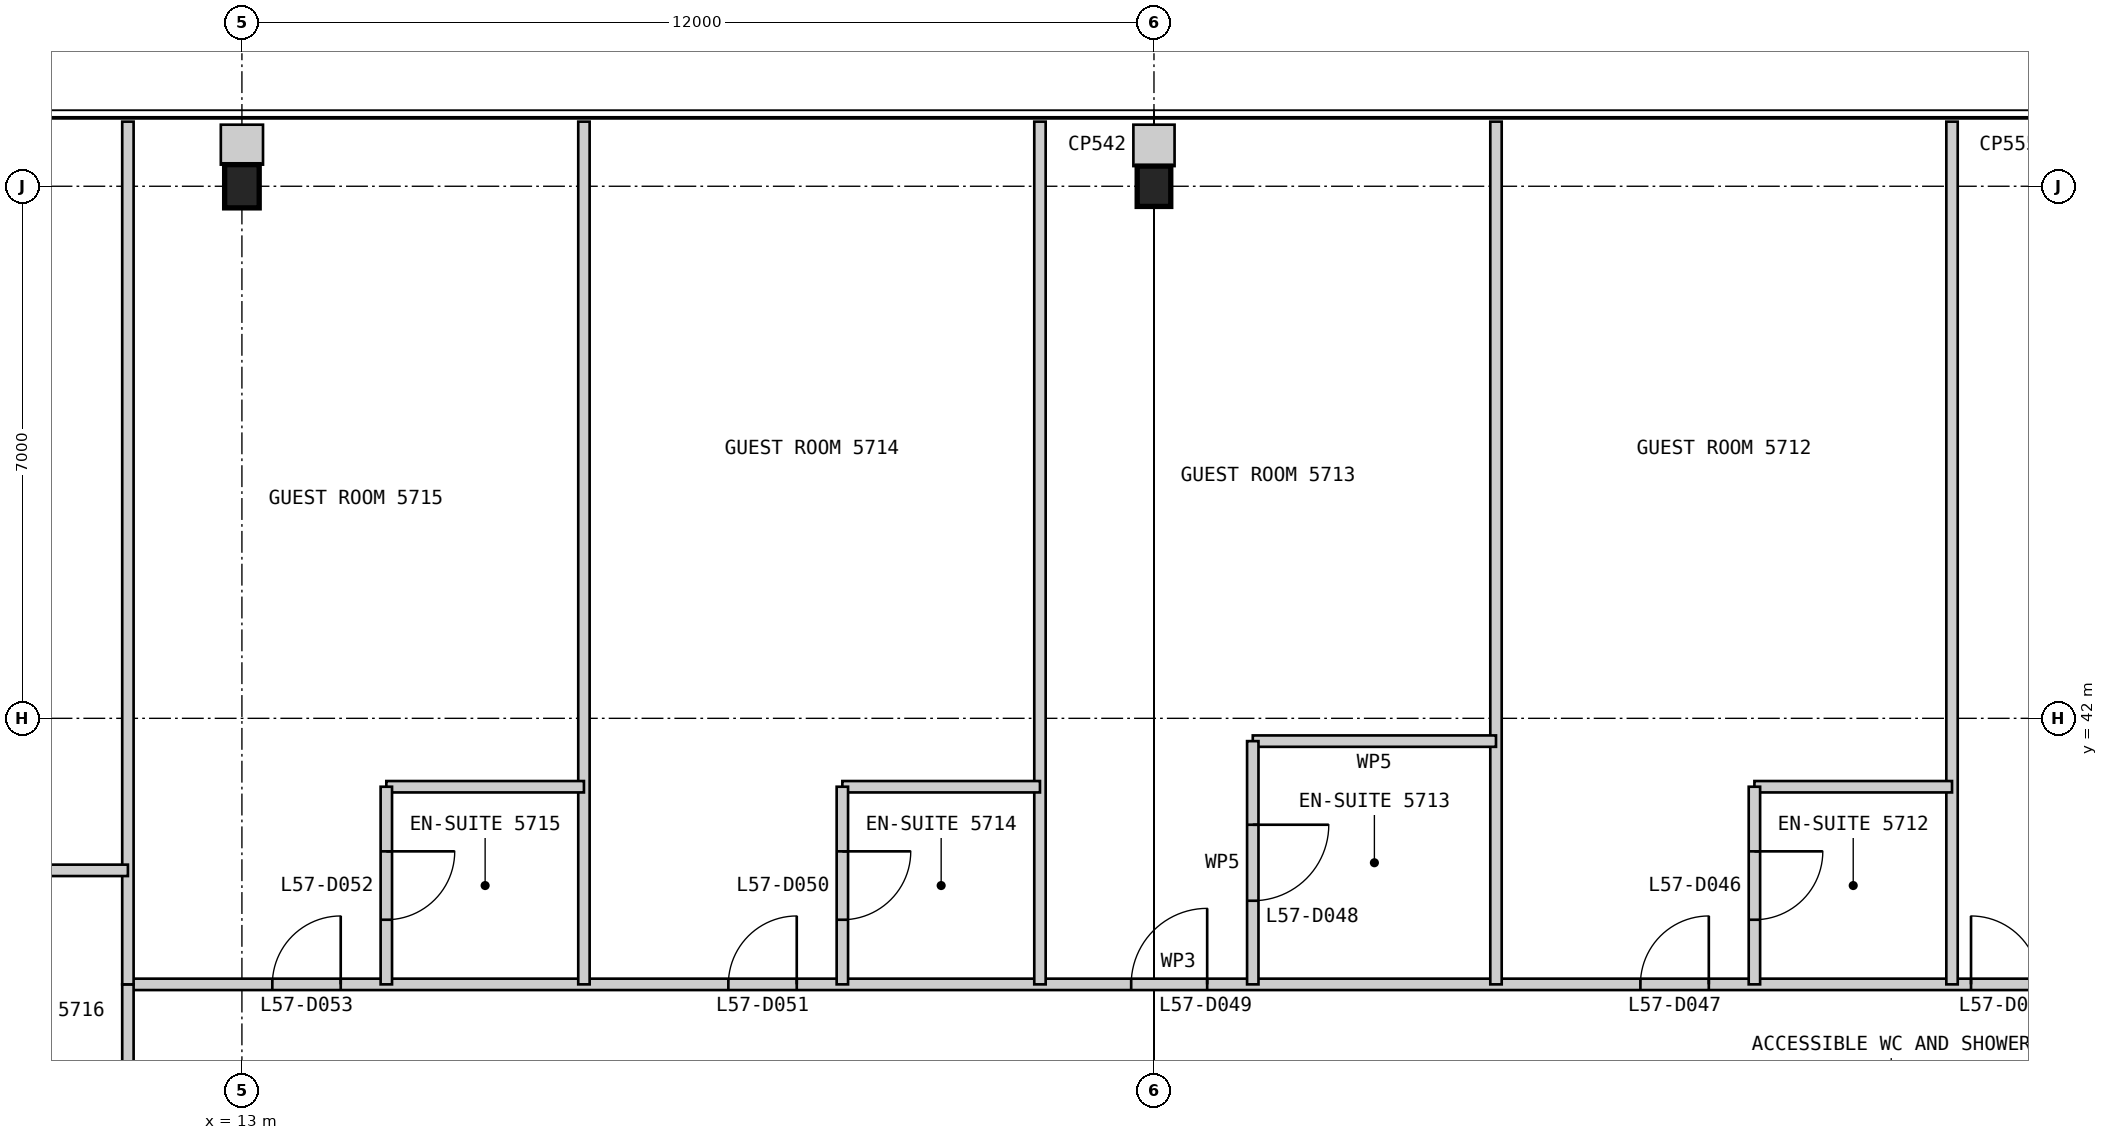
"""IFC4 building model, lengths in metres.
Left out: names, types, materials, properties, quantities, classifications, styles, units other than length and angle.
Written with IfcOpenShell. Run it as: python <this file> out.ifc"""

import sys

from ifc_helpers import new_model, si_unit, direction, frame, frame_2d, origin, origin_2d, place, context, subcontext, project, spatial, rectangle, i_section, extrude, element, fill, save


model = new_model("IFC4")
c1 = context("Model", 3, precision=1e-05, world=origin(), true_north=direction((0.0, 1.0)))
c2 = subcontext(c1, "Body", "Model", "MODEL_VIEW")
j1 = project(units=[si_unit("LENGTHUNIT", "METRE"), si_unit("PLANEANGLEUNIT", "RADIAN")], contexts=[c1])
p1 = place(None, origin())
s1 = spatial("IfcSite", under=j1, at=p1, CompositionType="ELEMENT")
p2 = place(p1, origin())
s2 = spatial("IfcBuilding", under=s1, at=p2, CompositionType="ELEMENT")
p3 = place(p2, frame((0.0, 0.0, 245.8)))
s3 = spatial("IfcBuildingStorey", under=s2, at=p3, CompositionType="ELEMENT", Elevation=245.8)
p4 = place(p3, frame((25.0, 49.0, 0.0), z_axis=(0.0, 0.0, 1.0), x_axis=(1.0, 0.0, 0.0)))
e1 = element("IfcColumn", 1, at=p4, inside=s3, PredefinedType="COLUMN", context=c2, shape_type="SweptSolid", body=[
    extrude(i_section(OverallWidth=0.442, OverallDepth=0.531, WebThickness=0.066, FlangeThickness=0.106, at=origin_2d()), origin(), (0.0, 0.0, 1.0), 3.4),
])
p5 = place(p3, frame((13.0, 49.0, 0.0), z_axis=(0.0, 0.0, 1.0), x_axis=(1.0, 0.0, 0.0)))
e2 = element("IfcColumn", 2, at=p5, inside=s3, PredefinedType="COLUMN", context=c2, shape_type="SweptSolid", body=[
    extrude(i_section(OverallWidth=0.455, OverallDepth=0.569, WebThickness=0.078, FlangeThickness=0.125, at=origin_2d()), origin(), (0.0, 0.0, 1.0), 3.4),
])
p6 = place(p3, frame((38.5, 38.5, 0.0), z_axis=(0.0, 0.0, 1.0), x_axis=(-1.0, 0.0, 0.0)))
e3 = element("IfcWall", 3, at=p6, inside=s3, PredefinedType="PARTITIONING", context=c2, shape_type="SweptSolid", body=[
    extrude(rectangle(XDim=27.0, YDim=0.15, at=frame_2d((13.5, 0.0))), origin(), (0.0, 0.0, 1.0), 3.25),
])
p7 = place(p6, frame((1.85, 0.0, 0.0)))
e4 = element("IfcOpeningElement", 4, at=p7, cuts=e3, PredefinedType="OPENING", context=c2, shape_type="SweptSolid", body=[
    extrude(rectangle(XDim=0.9, YDim=2.1, at=frame_2d((0.45, 1.05))), frame((0.0, 0.085, 0.0), z_axis=(0.0, -1.0, 0.0), x_axis=(1.0, 0.0, 0.0)), (0.0, 0.0, 1.0), 0.17),
])
p8 = place(p6, frame((6.2, 0.0, 0.0)))
e5 = element("IfcOpeningElement", 5, at=p8, cuts=e3, PredefinedType="OPENING", context=c2, shape_type="SweptSolid", body=[
    extrude(rectangle(XDim=0.9, YDim=2.1, at=frame_2d((0.45, 1.05))), frame((0.0, 0.085, 0.0), z_axis=(0.0, -1.0, 0.0), x_axis=(1.0, 0.0, 0.0)), (0.0, 0.0, 1.0), 0.17),
])
p9 = place(p6, frame((12.8, 0.0, 0.0)))
e6 = element("IfcOpeningElement", 6, at=p9, cuts=e3, PredefinedType="OPENING", context=c2, shape_type="SweptSolid", body=[
    extrude(rectangle(XDim=1.0, YDim=2.1, at=frame_2d((0.5, 1.05))), frame((0.0, 0.085, 0.0), z_axis=(0.0, -1.0, 0.0), x_axis=(1.0, 0.0, 0.0)), (0.0, 0.0, 1.0), 0.17),
])
p10 = place(p6, frame((18.2, 0.0, 0.0)))
e7 = element("IfcOpeningElement", 7, at=p10, cuts=e3, PredefinedType="OPENING", context=c2, shape_type="SweptSolid", body=[
    extrude(rectangle(XDim=0.9, YDim=2.1, at=frame_2d((0.45, 1.05))), frame((0.0, 0.085, 0.0), z_axis=(0.0, -1.0, 0.0), x_axis=(1.0, 0.0, 0.0)), (0.0, 0.0, 1.0), 0.17),
])
p11 = place(p6, frame((24.2, 0.0, 0.0)))
e8 = element("IfcOpeningElement", 8, at=p11, cuts=e3, PredefinedType="OPENING", context=c2, shape_type="SweptSolid", body=[
    extrude(rectangle(XDim=0.9, YDim=2.1, at=frame_2d((0.45, 1.05))), frame((0.0, 0.085, 0.0), z_axis=(0.0, -1.0, 0.0), x_axis=(1.0, 0.0, 0.0)), (0.0, 0.0, 1.0), 0.17),
])
p12 = place(p3, frame((35.5, 49.85, 0.0), z_axis=(0.0, 0.0, 1.0), x_axis=(0.0, -1.0, 0.0)))
e9 = element("IfcWall", 9, at=p12, inside=s3, PredefinedType="PARTITIONING", context=c2, shape_type="SweptSolid", body=[
    extrude(rectangle(XDim=11.35, YDim=0.15, at=frame_2d((5.675, 0.0))), origin(), (0.0, 0.0, 1.0), 3.25),
])
p13 = place(p3, frame((35.5, 41.1, 0.0), z_axis=(0.0, 0.0, 1.0), x_axis=(-1.0, 0.0, 0.0)))
e10 = element("IfcWall", 10, at=p13, inside=s3, PredefinedType="PARTITIONING", context=c2, shape_type="SweptSolid", body=[
    extrude(rectangle(XDim=2.6, YDim=0.15, at=frame_2d((1.3, 0.0))), origin(), (0.0, 0.0, 1.0), 3.25),
])
p14 = place(p3, frame((32.9, 41.1, 0.0), z_axis=(0.0, 0.0, 1.0), x_axis=(0.0, -1.0, 0.0)))
e11 = element("IfcWall", 11, at=p14, inside=s3, PredefinedType="PARTITIONING", context=c2, shape_type="SweptSolid", body=[
    extrude(rectangle(XDim=2.6, YDim=0.15, at=frame_2d((1.3, 0.0))), origin(), (0.0, 0.0, 1.0), 3.25),
])
p15 = place(p14, frame((0.85, 0.0, 0.0)))
e12 = element("IfcOpeningElement", 12, at=p15, cuts=e11, PredefinedType="OPENING", context=c2, shape_type="SweptSolid", body=[
    extrude(rectangle(XDim=0.9, YDim=2.1, at=frame_2d((0.45, 1.05))), frame((0.0, 0.085, 0.0), z_axis=(0.0, -1.0, 0.0), x_axis=(1.0, 0.0, 0.0)), (0.0, 0.0, 1.0), 0.17),
])
p16 = place(p3, frame((29.5, 49.85, 0.0), z_axis=(0.0, 0.0, 1.0), x_axis=(0.0, -1.0, 0.0)))
e13 = element("IfcWall", 13, at=p16, inside=s3, PredefinedType="PARTITIONING", context=c2, shape_type="SweptSolid", body=[
    extrude(rectangle(XDim=11.35, YDim=0.15, at=frame_2d((5.675, 0.0))), origin(), (0.0, 0.0, 1.0), 3.25),
])
p17 = place(p3, frame((29.5, 41.7, 0.0), z_axis=(0.0, 0.0, 1.0), x_axis=(-1.0, 0.0, 0.0)))
e14 = element("IfcWall", 14, at=p17, inside=s3, PredefinedType="PARTITIONING", context=c2, shape_type="SweptSolid", body=[
    extrude(rectangle(XDim=3.2, YDim=0.15, at=frame_2d((1.6, 0.0))), origin(), (0.0, 0.0, 1.0), 3.25),
])
p18 = place(p3, frame((26.3, 41.7, 0.0), z_axis=(0.0, 0.0, 1.0), x_axis=(0.0, -1.0, 0.0)))
e15 = element("IfcWall", 15, at=p18, inside=s3, PredefinedType="PARTITIONING", context=c2, shape_type="SweptSolid", body=[
    extrude(rectangle(XDim=3.2, YDim=0.15, at=frame_2d((1.6, 0.0))), origin(), (0.0, 0.0, 1.0), 3.25),
])
p19 = place(p18, frame((1.1, 0.0, 0.0)))
e16 = element("IfcOpeningElement", 16, at=p19, cuts=e15, PredefinedType="OPENING", context=c2, shape_type="SweptSolid", body=[
    extrude(rectangle(XDim=1.0, YDim=2.1, at=frame_2d((0.5, 1.05))), frame((0.0, 0.085, 0.0), z_axis=(0.0, -1.0, 0.0), x_axis=(1.0, 0.0, 0.0)), (0.0, 0.0, 1.0), 0.17),
])
p20 = place(p3, frame((23.5, 49.85, 0.0), z_axis=(0.0, 0.0, 1.0), x_axis=(0.0, -1.0, 0.0)))
e17 = element("IfcWall", 17, at=p20, inside=s3, PredefinedType="PARTITIONING", context=c2, shape_type="SweptSolid", body=[
    extrude(rectangle(XDim=11.35, YDim=0.15, at=frame_2d((5.675, 0.0))), origin(), (0.0, 0.0, 1.0), 3.25),
])
p21 = place(p3, frame((23.5, 41.1, 0.0), z_axis=(0.0, 0.0, 1.0), x_axis=(-1.0, 0.0, 0.0)))
e18 = element("IfcWall", 18, at=p21, inside=s3, PredefinedType="PARTITIONING", context=c2, shape_type="SweptSolid", body=[
    extrude(rectangle(XDim=2.6, YDim=0.15, at=frame_2d((1.3, 0.0))), origin(), (0.0, 0.0, 1.0), 3.25),
])
p22 = place(p3, frame((20.9, 41.1, 0.0), z_axis=(0.0, 0.0, 1.0), x_axis=(0.0, -1.0, 0.0)))
e19 = element("IfcWall", 19, at=p22, inside=s3, PredefinedType="PARTITIONING", context=c2, shape_type="SweptSolid", body=[
    extrude(rectangle(XDim=2.6, YDim=0.15, at=frame_2d((1.3, 0.0))), origin(), (0.0, 0.0, 1.0), 3.25),
])
p23 = place(p22, frame((0.85, 0.0, 0.0)))
e20 = element("IfcOpeningElement", 20, at=p23, cuts=e19, PredefinedType="OPENING", context=c2, shape_type="SweptSolid", body=[
    extrude(rectangle(XDim=0.9, YDim=2.1, at=frame_2d((0.45, 1.05))), frame((0.0, 0.085, 0.0), z_axis=(0.0, -1.0, 0.0), x_axis=(1.0, 0.0, 0.0)), (0.0, 0.0, 1.0), 0.17),
])
p24 = place(p3, frame((17.5, 49.85, 0.0), z_axis=(0.0, 0.0, 1.0), x_axis=(0.0, -1.0, 0.0)))
e21 = element("IfcWall", 21, at=p24, inside=s3, PredefinedType="PARTITIONING", context=c2, shape_type="SweptSolid", body=[
    extrude(rectangle(XDim=11.35, YDim=0.15, at=frame_2d((5.675, 0.0))), origin(), (0.0, 0.0, 1.0), 3.25),
])
p25 = place(p3, frame((17.5, 41.1, 0.0), z_axis=(0.0, 0.0, 1.0), x_axis=(-1.0, 0.0, 0.0)))
e22 = element("IfcWall", 22, at=p25, inside=s3, PredefinedType="PARTITIONING", context=c2, shape_type="SweptSolid", body=[
    extrude(rectangle(XDim=2.6, YDim=0.15, at=frame_2d((1.3, 0.0))), origin(), (0.0, 0.0, 1.0), 3.25),
])
p26 = place(p3, frame((14.9, 41.1, 0.0), z_axis=(0.0, 0.0, 1.0), x_axis=(0.0, -1.0, 0.0)))
e23 = element("IfcWall", 23, at=p26, inside=s3, PredefinedType="PARTITIONING", context=c2, shape_type="SweptSolid", body=[
    extrude(rectangle(XDim=2.6, YDim=0.15, at=frame_2d((1.3, 0.0))), origin(), (0.0, 0.0, 1.0), 3.25),
])
p27 = place(p26, frame((0.85, 0.0, 0.0)))
e24 = element("IfcOpeningElement", 24, at=p27, cuts=e23, PredefinedType="OPENING", context=c2, shape_type="SweptSolid", body=[
    extrude(rectangle(XDim=0.9, YDim=2.1, at=frame_2d((0.45, 1.05))), frame((0.0, 0.085, 0.0), z_axis=(0.0, -1.0, 0.0), x_axis=(1.0, 0.0, 0.0)), (0.0, 0.0, 1.0), 0.17),
])
p28 = place(p3, frame((11.5, 38.5, 0.0), z_axis=(0.0, 0.0, 1.0), x_axis=(0.0, -1.0, 0.0)))
e25 = element("IfcWall", 25, at=p28, inside=s3, PredefinedType="PARTITIONING", context=c2, shape_type="SweptSolid", body=[
    extrude(rectangle(XDim=27.0, YDim=0.15, at=frame_2d((13.5, 0.0))), origin(), (0.0, 0.0, 1.0), 3.25),
])
p29 = place(p28, frame((1.85, 0.0, 0.0)))
e26 = element("IfcOpeningElement", 26, at=p29, cuts=e25, PredefinedType="OPENING", context=c2, shape_type="SweptSolid", body=[
    extrude(rectangle(XDim=0.9, YDim=2.1, at=frame_2d((0.45, 1.05))), frame((0.0, 0.085, 0.0), z_axis=(0.0, -1.0, 0.0), x_axis=(1.0, 0.0, 0.0)), (0.0, 0.0, 1.0), 0.17),
])
p30 = place(p28, frame((6.2, 0.0, 0.0)))
e27 = element("IfcOpeningElement", 27, at=p30, cuts=e25, PredefinedType="OPENING", context=c2, shape_type="SweptSolid", body=[
    extrude(rectangle(XDim=0.9, YDim=2.1, at=frame_2d((0.45, 1.05))), frame((0.0, 0.085, 0.0), z_axis=(0.0, -1.0, 0.0), x_axis=(1.0, 0.0, 0.0)), (0.0, 0.0, 1.0), 0.17),
])
p31 = place(p28, frame((12.2, 0.0, 0.0)))
e28 = element("IfcOpeningElement", 28, at=p31, cuts=e25, PredefinedType="OPENING", context=c2, shape_type="SweptSolid", body=[
    extrude(rectangle(XDim=0.9, YDim=2.1, at=frame_2d((0.45, 1.05))), frame((0.0, 0.085, 0.0), z_axis=(0.0, -1.0, 0.0), x_axis=(1.0, 0.0, 0.0)), (0.0, 0.0, 1.0), 0.17),
])
p32 = place(p28, frame((18.2, 0.0, 0.0)))
e29 = element("IfcOpeningElement", 29, at=p32, cuts=e25, PredefinedType="OPENING", context=c2, shape_type="SweptSolid", body=[
    extrude(rectangle(XDim=0.9, YDim=2.1, at=frame_2d((0.45, 1.05))), frame((0.0, 0.085, 0.0), z_axis=(0.0, -1.0, 0.0), x_axis=(1.0, 0.0, 0.0)), (0.0, 0.0, 1.0), 0.17),
])
p33 = place(p28, frame((24.2, 0.0, 0.0)))
e30 = element("IfcOpeningElement", 30, at=p33, cuts=e25, PredefinedType="OPENING", context=c2, shape_type="SweptSolid", body=[
    extrude(rectangle(XDim=0.9, YDim=2.1, at=frame_2d((0.45, 1.05))), frame((0.0, 0.085, 0.0), z_axis=(0.0, -1.0, 0.0), x_axis=(1.0, 0.0, 0.0)), (0.0, 0.0, 1.0), 0.17),
])
p34 = place(p3, frame((11.5, 49.85, 0.0), z_axis=(0.0, 0.0, 1.0), x_axis=(0.0, -1.0, 0.0)))
e31 = element("IfcWall", 31, at=p34, inside=s3, PredefinedType="PARTITIONING", context=c2, shape_type="SweptSolid", body=[
    extrude(rectangle(XDim=11.35, YDim=0.15, at=frame_2d((5.675, 0.0))), origin(), (0.0, 0.0, 1.0), 3.25),
])
p35 = place(p3, frame((8.9, 40.0, 0.0), z_axis=(0.0, 0.0, 1.0), x_axis=(1.0, 0.0, 0.0)))
e32 = element("IfcWall", 32, at=p35, inside=s3, PredefinedType="PARTITIONING", context=c2, shape_type="SweptSolid", body=[
    extrude(rectangle(XDim=2.6, YDim=0.15, at=frame_2d((1.3, 0.0))), origin(), (0.0, 0.0, 1.0), 3.25),
])
p36 = place(p3, frame((25.0, 49.81, 0.0), z_axis=(0.0, 0.0, 1.0), x_axis=(0.0, -1.0, 0.0)))
e33 = element("IfcWall", 33, at=p36, inside=s3, PredefinedType="PARTITIONING", context=c2, shape_type="SweptSolid", body=[
    extrude(rectangle(XDim=0.545, YDim=0.542, at=frame_2d((0.272, 0.0))), origin(), (0.0, 0.0, 1.0), 3.25),
])
p37 = place(p3, frame((13.0, 49.81, 0.0), z_axis=(0.0, 0.0, 1.0), x_axis=(0.0, -1.0, 0.0)))
e34 = element("IfcWall", 34, at=p37, inside=s3, PredefinedType="PARTITIONING", context=c2, shape_type="SweptSolid", body=[
    extrude(rectangle(XDim=0.526, YDim=0.555, at=frame_2d((0.263, 0.0))), origin(), (0.0, 0.0, 1.0), 3.25),
])
p38 = place(p7, frame((0.9, 0.0, 0.0), z_axis=(0.0, 0.0, 1.0), x_axis=(-1.0, 0.0, 0.0)))
e35 = element("IfcDoor", 35, at=p38, inside=s3, OperationType="SINGLE_SWING_LEFT", PredefinedType="DOOR", context=c2, shape_type="SweptSolid", body=[
    extrude(rectangle(XDim=0.9, YDim=2.1, at=frame_2d((0.45, 1.05))), frame((0.0, 0.025, 0.0), z_axis=(0.0, -1.0, 0.0), x_axis=(1.0, 0.0, 0.0)), (0.0, 0.0, 1.0), 0.05),
])
fill(e4, e35)
p39 = place(p15, origin())
e36 = element("IfcDoor", 36, at=p39, inside=s3, OperationType="SINGLE_SWING_LEFT", PredefinedType="DOOR", context=c2, shape_type="SweptSolid", body=[
    extrude(rectangle(XDim=0.9, YDim=2.1, at=frame_2d((0.45, 1.05))), frame((0.0, 0.025, 0.0), z_axis=(0.0, -1.0, 0.0), x_axis=(1.0, 0.0, 0.0)), (0.0, 0.0, 1.0), 0.05),
])
fill(e12, e36)
p40 = place(p8, frame((0.9, 0.0, 0.0), z_axis=(0.0, 0.0, 1.0), x_axis=(-1.0, 0.0, 0.0)))
e37 = element("IfcDoor", 37, at=p40, inside=s3, OperationType="SINGLE_SWING_RIGHT", PredefinedType="DOOR", context=c2, shape_type="SweptSolid", body=[
    extrude(rectangle(XDim=0.9, YDim=2.1, at=frame_2d((0.45, 1.05))), frame((0.0, 0.025, 0.0), z_axis=(0.0, -1.0, 0.0), x_axis=(1.0, 0.0, 0.0)), (0.0, 0.0, 1.0), 0.05),
])
fill(e5, e37)
p41 = place(p19, origin())
e38 = element("IfcDoor", 38, at=p41, inside=s3, OperationType="SINGLE_SWING_LEFT", PredefinedType="DOOR", context=c2, shape_type="SweptSolid", body=[
    extrude(rectangle(XDim=1.0, YDim=2.1, at=frame_2d((0.5, 1.05))), frame((0.0, 0.025, 0.0), z_axis=(0.0, -1.0, 0.0), x_axis=(1.0, 0.0, 0.0)), (0.0, 0.0, 1.0), 0.05),
])
fill(e16, e38)
p42 = place(p9, frame((1.0, 0.0, 0.0), z_axis=(0.0, 0.0, 1.0), x_axis=(-1.0, 0.0, 0.0)))
e39 = element("IfcDoor", 39, at=p42, inside=s3, OperationType="SINGLE_SWING_RIGHT", PredefinedType="DOOR", context=c2, shape_type="SweptSolid", body=[
    extrude(rectangle(XDim=1.0, YDim=2.1, at=frame_2d((0.5, 1.05))), frame((0.0, 0.025, 0.0), z_axis=(0.0, -1.0, 0.0), x_axis=(1.0, 0.0, 0.0)), (0.0, 0.0, 1.0), 0.05),
])
fill(e6, e39)
p43 = place(p23, origin())
e40 = element("IfcDoor", 40, at=p43, inside=s3, OperationType="SINGLE_SWING_LEFT", PredefinedType="DOOR", context=c2, shape_type="SweptSolid", body=[
    extrude(rectangle(XDim=0.9, YDim=2.1, at=frame_2d((0.45, 1.05))), frame((0.0, 0.025, 0.0), z_axis=(0.0, -1.0, 0.0), x_axis=(1.0, 0.0, 0.0)), (0.0, 0.0, 1.0), 0.05),
])
fill(e20, e40)
p44 = place(p10, frame((0.9, 0.0, 0.0), z_axis=(0.0, 0.0, 1.0), x_axis=(-1.0, 0.0, 0.0)))
e41 = element("IfcDoor", 41, at=p44, inside=s3, OperationType="SINGLE_SWING_RIGHT", PredefinedType="DOOR", context=c2, shape_type="SweptSolid", body=[
    extrude(rectangle(XDim=0.9, YDim=2.1, at=frame_2d((0.45, 1.05))), frame((0.0, 0.025, 0.0), z_axis=(0.0, -1.0, 0.0), x_axis=(1.0, 0.0, 0.0)), (0.0, 0.0, 1.0), 0.05),
])
fill(e7, e41)
p45 = place(p27, origin())
e42 = element("IfcDoor", 42, at=p45, inside=s3, OperationType="SINGLE_SWING_LEFT", PredefinedType="DOOR", context=c2, shape_type="SweptSolid", body=[
    extrude(rectangle(XDim=0.9, YDim=2.1, at=frame_2d((0.45, 1.05))), frame((0.0, 0.025, 0.0), z_axis=(0.0, -1.0, 0.0), x_axis=(1.0, 0.0, 0.0)), (0.0, 0.0, 1.0), 0.05),
])
fill(e24, e42)
p46 = place(p11, frame((0.9, 0.0, 0.0), z_axis=(0.0, 0.0, 1.0), x_axis=(-1.0, 0.0, 0.0)))
e43 = element("IfcDoor", 43, at=p46, inside=s3, OperationType="SINGLE_SWING_RIGHT", PredefinedType="DOOR", context=c2, shape_type="SweptSolid", body=[
    extrude(rectangle(XDim=0.9, YDim=2.1, at=frame_2d((0.45, 1.05))), frame((0.0, 0.025, 0.0), z_axis=(0.0, -1.0, 0.0), x_axis=(1.0, 0.0, 0.0)), (0.0, 0.0, 1.0), 0.05),
])
fill(e8, e43)
save(model, sys.argv[1])
